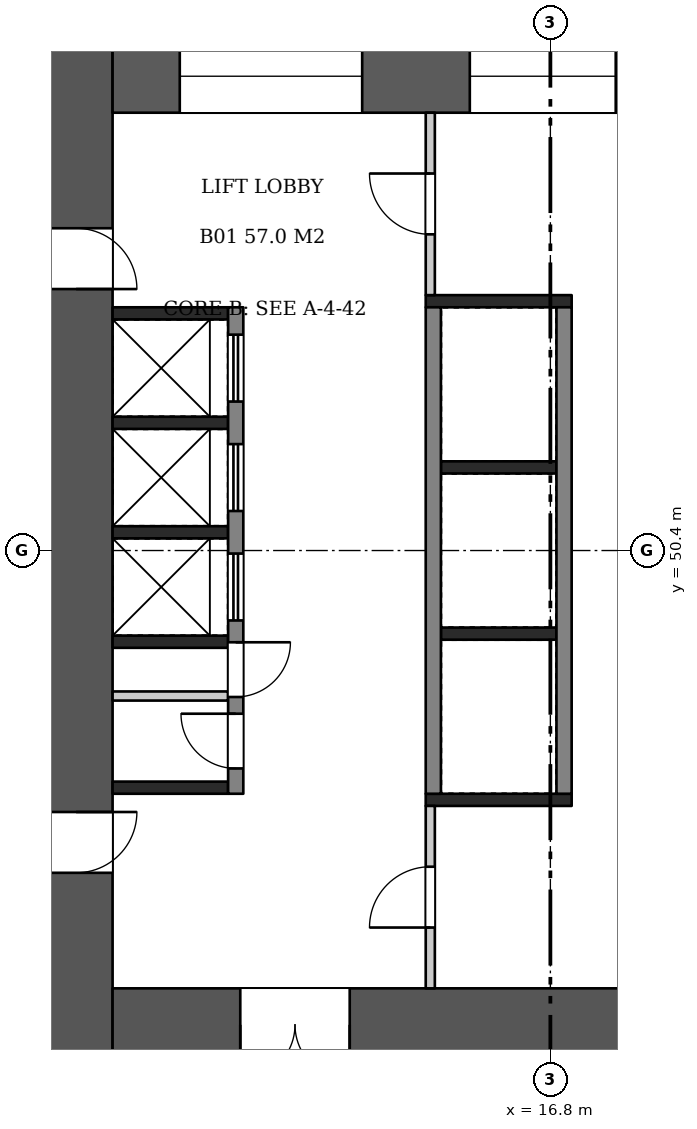
"""IFC4 building model, lengths in metres.
Left out: names, types, materials, properties, quantities, classifications, styles, units other than length and angle.
Written with IfcOpenShell. Run it as: python <this file> out.ifc"""

import sys

from ifc_helpers import new_model, si_unit, direction, frame, frame_2d, origin, place, context, subcontext, project, spatial, rectangle, extrude, element, fill, save


model = new_model("IFC4")
c1 = context("Model", 3, precision=1e-05, world=origin(), true_north=direction((0.0, 1.0)))
c2 = subcontext(c1, "Body", "Model", "MODEL_VIEW")
j1 = project(units=[si_unit("LENGTHUNIT", "METRE"), si_unit("PLANEANGLEUNIT", "RADIAN")], contexts=[c1])
p1 = place(None, origin())
s1 = spatial("IfcSite", under=j1, at=p1, CompositionType="ELEMENT")
p2 = place(p1, origin())
s2 = spatial("IfcBuilding", under=s1, at=p2, CompositionType="ELEMENT")
p3 = place(p2, frame((0.0, 0.0, 9.0)))
s3 = spatial("IfcBuildingStorey", under=s2, at=p3, CompositionType="ELEMENT", Elevation=9.0)
p4 = place(p3, frame((9.0, 58.8, 0.0), z_axis=(0.0, 0.0, 1.0), x_axis=(0.0, -1.0, 0.0)))
e1 = element("IfcWall", 1, at=p4, inside=s3, PredefinedType="SHEAR", context=c2, shape_type="SweptSolid", body=[
    extrude(rectangle(XDim=16.8, YDim=1.2, at=frame_2d((8.4, 0.0))), origin(), (0.0, 0.0, 1.0), 4.98),
])
p5 = place(p4, frame((3.1, 0.0, 0.0)))
e2 = element("IfcOpeningElement", 2, at=p5, cuts=e1, PredefinedType="OPENING", context=c2, shape_type="SweptSolid", body=[
    extrude(rectangle(XDim=1.0, YDim=2.1, at=frame_2d((0.5, 1.05))), frame((0.0, 0.61, 0.0), z_axis=(0.0, -1.0, 0.0), x_axis=(1.0, 0.0, 0.0)), (0.0, 0.0, 1.0), 1.22),
])
p6 = place(p4, frame((12.7, 0.0, 0.0)))
e3 = element("IfcOpeningElement", 3, at=p6, cuts=e1, PredefinedType="OPENING", context=c2, shape_type="SweptSolid", body=[
    extrude(rectangle(XDim=1.0, YDim=2.1, at=frame_2d((0.5, 1.05))), frame((0.0, 0.61, 0.0), z_axis=(0.0, -1.0, 0.0), x_axis=(1.0, 0.0, 0.0)), (0.0, 0.0, 1.0), 1.22),
])
p7 = place(p3, frame((9.6, 58.2, 0.0), z_axis=(0.0, 0.0, 1.0), x_axis=(1.0, 0.0, 0.0)))
e4 = element("IfcWall", 4, at=p7, inside=s3, PredefinedType="SHEAR", context=c2, shape_type="SweptSolid", body=[
    extrude(rectangle(XDim=14.4, YDim=1.2, at=frame_2d((7.2, 0.0))), origin(), (0.0, 0.0, 1.0), 4.98),
])
p8 = place(p7, frame((1.105, 0.0, 0.6)))
e5 = element("IfcOpeningElement", 5, at=p8, cuts=e4, PredefinedType="OPENING", context=c2, shape_type="SweptSolid", body=[
    extrude(rectangle(XDim=3.0, YDim=2.1, at=frame_2d((1.5, 1.05))), frame((0.0, 0.61, 0.0), z_axis=(0.0, -1.0, 0.0), x_axis=(1.0, 0.0, 0.0)), (0.0, 0.0, 1.0), 1.22),
])
p9 = place(p7, frame((5.875, 0.0, 0.6)))
e6 = element("IfcOpeningElement", 6, at=p9, cuts=e4, PredefinedType="OPENING", context=c2, shape_type="SweptSolid", body=[
    extrude(rectangle(XDim=2.4, YDim=2.1, at=frame_2d((1.2, 1.05))), frame((0.0, 0.61, 0.0), z_axis=(0.0, -1.0, 0.0), x_axis=(1.0, 0.0, 0.0)), (0.0, 0.0, 1.0), 1.22),
])
p10 = place(p7, frame((9.993, 0.0, 0.5)))
e7 = element("IfcOpeningElement", 7, at=p10, cuts=e4, PredefinedType="OPENING", context=c2, shape_type="SweptSolid", body=[
    extrude(rectangle(XDim=1.2, YDim=2.4, at=frame_2d((0.6, 1.2))), frame((0.0, 0.61, 0.0), z_axis=(0.0, -1.0, 0.0), x_axis=(1.0, 0.0, 0.0)), (0.0, 0.0, 1.0), 1.22),
])
p11 = place(p7, frame((12.197, 0.0, 0.5)))
e8 = element("IfcOpeningElement", 8, at=p11, cuts=e4, PredefinedType="OPENING", context=c2, shape_type="SweptSolid", body=[
    extrude(rectangle(XDim=1.2, YDim=2.4, at=frame_2d((0.6, 1.2))), frame((0.0, 0.61, 0.0), z_axis=(0.0, -1.0, 0.0), x_axis=(1.0, 0.0, 0.0)), (0.0, 0.0, 1.0), 1.22),
])
p12 = place(p3, frame((9.6, 42.6, 0.0), z_axis=(0.0, 0.0, 1.0), x_axis=(1.0, 0.0, 0.0)))
e9 = element("IfcWall", 9, at=p12, inside=s3, PredefinedType="SHEAR", context=c2, shape_type="SweptSolid", body=[
    extrude(rectangle(XDim=14.4, YDim=1.2, at=frame_2d((7.2, 0.0))), origin(), (0.0, 0.0, 1.0), 4.98),
])
p13 = place(p12, frame((2.1, 0.0, 0.0)))
e10 = element("IfcOpeningElement", 10, at=p13, cuts=e9, PredefinedType="OPENING", context=c2, shape_type="SweptSolid", body=[
    extrude(rectangle(XDim=1.8, YDim=2.1, at=frame_2d((0.9, 1.05))), frame((0.0, 0.61, 0.0), z_axis=(0.0, -1.0, 0.0), x_axis=(1.0, 0.0, 0.0)), (0.0, 0.0, 1.0), 1.22),
])
for number, where, z_axis, x_axis in (
    (11, (9.6, 54.3, 0.0), (0.0, 0.0, 1.0), (1.0, 0.0, 0.0)),
    (12, (9.6, 52.5, 0.0), (0.0, 0.0, 1.0), (1.0, 0.0, 0.0)),
    (13, (9.6, 50.7, 0.0), (0.0, 0.0, 1.0), (1.0, 0.0, 0.0)),
    (14, (9.6, 48.9, 0.0), (0.0, 0.0, 1.0), (1.0, 0.0, 0.0)),
    (15, (9.6, 46.5, 0.0), (0.0, 0.0, 1.0), (1.0, 0.0, 0.0)),
):
    element("IfcWall", number, at=place(p3, frame(where, z_axis=z_axis, x_axis=x_axis)), inside=s3, PredefinedType="SHEAR", context=c2, shape_type="SweptSolid", body=[
        extrude(rectangle(XDim=1.9, YDim=0.2, at=frame_2d((0.95, 0.0))), origin(), (0.0, 0.0, 1.0), 4.98),
    ])
p14 = place(p3, frame((9.6, 48.008, 0.0), z_axis=(0.0, 0.0, 1.0), x_axis=(1.0, 0.0, 0.0)))
e16 = element("IfcWall", 16, at=p14, inside=s3, PredefinedType="PARTITIONING", context=c2, shape_type="SweptSolid", body=[
    extrude(rectangle(XDim=1.9, YDim=0.15, at=frame_2d((0.95, 0.0))), origin(), (0.0, 0.0, 1.0), 4.98),
])
p15 = place(p3, frame((11.625, 54.4, 0.0), z_axis=(0.0, 0.0, 1.0), x_axis=(0.0, -1.0, 0.0)))
e17 = element("IfcWall", 17, at=p15, inside=s3, PredefinedType="SHEAR", context=c2, shape_type="SweptSolid", body=[
    extrude(rectangle(XDim=8.0, YDim=0.25, at=frame_2d((4.0, 0.0))), origin(), (0.0, 0.0, 1.0), 4.98),
])
p16 = place(p15, frame((0.45, 0.0, 0.0)))
e18 = element("IfcOpeningElement", 18, at=p16, cuts=e17, PredefinedType="OPENING", context=c2, shape_type="SweptSolid", body=[
    extrude(rectangle(XDim=1.1, YDim=2.1, at=frame_2d((0.55, 1.05))), frame((0.0, 0.135, 0.0), z_axis=(0.0, -1.0, 0.0), x_axis=(1.0, 0.0, 0.0)), (0.0, 0.0, 1.0), 0.27),
])
p17 = place(p15, frame((2.25, 0.0, 0.0)))
e19 = element("IfcOpeningElement", 19, at=p17, cuts=e17, PredefinedType="OPENING", context=c2, shape_type="SweptSolid", body=[
    extrude(rectangle(XDim=1.1, YDim=2.1, at=frame_2d((0.55, 1.05))), frame((0.0, 0.135, 0.0), z_axis=(0.0, -1.0, 0.0), x_axis=(1.0, 0.0, 0.0)), (0.0, 0.0, 1.0), 0.27),
])
p18 = place(p15, frame((4.05, 0.0, 0.0)))
e20 = element("IfcOpeningElement", 20, at=p18, cuts=e17, PredefinedType="OPENING", context=c2, shape_type="SweptSolid", body=[
    extrude(rectangle(XDim=1.1, YDim=2.1, at=frame_2d((0.55, 1.05))), frame((0.0, 0.135, 0.0), z_axis=(0.0, -1.0, 0.0), x_axis=(1.0, 0.0, 0.0)), (0.0, 0.0, 1.0), 0.27),
])
p19 = place(p15, frame((5.509, 0.0, 0.0)))
e21 = element("IfcOpeningElement", 21, at=p19, cuts=e17, PredefinedType="OPENING", context=c2, shape_type="SweptSolid", body=[
    extrude(rectangle(XDim=0.9, YDim=2.1, at=frame_2d((0.45, 1.05))), frame((0.0, 0.135, 0.0), z_axis=(0.0, -1.0, 0.0), x_axis=(1.0, 0.0, 0.0)), (0.0, 0.0, 1.0), 0.27),
])
p20 = place(p15, frame((6.684, 0.0, 0.0)))
e22 = element("IfcOpeningElement", 22, at=p20, cuts=e17, PredefinedType="OPENING", context=c2, shape_type="SweptSolid", body=[
    extrude(rectangle(XDim=0.9, YDim=2.1, at=frame_2d((0.45, 1.05))), frame((0.0, 0.135, 0.0), z_axis=(0.0, -1.0, 0.0), x_axis=(1.0, 0.0, 0.0)), (0.0, 0.0, 1.0), 0.27),
])
for number, where, z_axis, x_axis in (
    (23, (15.0, 51.767, 0.0), (0.0, 0.0, 1.0), (1.0, 0.0, 0.0)),
    (24, (15.0, 49.033, 0.0), (0.0, 0.0, 1.0), (1.0, 0.0, 0.0)),
):
    element("IfcWall", number, at=place(p3, frame(where, z_axis=z_axis, x_axis=x_axis)), inside=s3, PredefinedType="SHEAR", context=c2, shape_type="SweptSolid", body=[
        extrude(rectangle(XDim=1.9, YDim=0.2, at=frame_2d((0.95, 0.0))), origin(), (0.0, 0.0, 1.0), 4.98),
    ])
for number, where, z_axis, x_axis in (
    (25, (14.875, 54.4, 0.0), (0.0, 0.0, 1.0), (0.0, -1.0, 0.0)),
    (26, (17.025, 54.4, 0.0), (0.0, 0.0, 1.0), (0.0, -1.0, 0.0)),
):
    element("IfcWall", number, at=place(p3, frame(where, z_axis=z_axis, x_axis=x_axis)), inside=s3, PredefinedType="SHEAR", context=c2, shape_type="SweptSolid", body=[
        extrude(rectangle(XDim=8.0, YDim=0.25, at=frame_2d((4.0, 0.0))), origin(), (0.0, 0.0, 1.0), 4.98),
    ])
p21 = place(p3, frame((14.75, 54.5, 0.0), z_axis=(0.0, 0.0, 1.0), x_axis=(1.0, 0.0, 0.0)))
e27 = element("IfcWall", 27, at=p21, inside=s3, PredefinedType="SHEAR", context=c2, shape_type="SweptSolid", body=[
    extrude(rectangle(XDim=2.4, YDim=0.2, at=frame_2d((1.2, 0.0))), origin(), (0.0, 0.0, 1.0), 4.98),
])
p22 = place(p3, frame((14.825, 57.6, 0.0), z_axis=(0.0, 0.0, 1.0), x_axis=(0.0, -1.0, 0.0)))
e28 = element("IfcWall", 28, at=p22, inside=s3, PredefinedType="PARTITIONING", context=c2, shape_type="SweptSolid", body=[
    extrude(rectangle(XDim=3.0, YDim=0.15, at=frame_2d((1.5, 0.0))), origin(), (0.0, 0.0, 1.0), 4.98),
])
p23 = place(p22, frame((1.0, 0.0, 0.0)))
e29 = element("IfcOpeningElement", 29, at=p23, cuts=e28, PredefinedType="OPENING", context=c2, shape_type="SweptSolid", body=[
    extrude(rectangle(XDim=1.0, YDim=2.1, at=frame_2d((0.5, 1.05))), frame((0.0, 0.085, 0.0), z_axis=(0.0, -1.0, 0.0), x_axis=(1.0, 0.0, 0.0)), (0.0, 0.0, 1.0), 0.17),
])
p24 = place(p3, frame((14.75, 46.3, 0.0), z_axis=(0.0, 0.0, 1.0), x_axis=(1.0, 0.0, 0.0)))
e30 = element("IfcWall", 30, at=p24, inside=s3, PredefinedType="SHEAR", context=c2, shape_type="SweptSolid", body=[
    extrude(rectangle(XDim=2.4, YDim=0.2, at=frame_2d((1.2, 0.0))), origin(), (0.0, 0.0, 1.0), 4.98),
])
p25 = place(p3, frame((14.825, 46.2, 0.0), z_axis=(0.0, 0.0, 1.0), x_axis=(0.0, -1.0, 0.0)))
e31 = element("IfcWall", 31, at=p25, inside=s3, PredefinedType="PARTITIONING", context=c2, shape_type="SweptSolid", body=[
    extrude(rectangle(XDim=3.0, YDim=0.15, at=frame_2d((1.5, 0.0))), origin(), (0.0, 0.0, 1.0), 4.98),
])
p26 = place(p25, frame((1.0, 0.0, 0.0)))
e32 = element("IfcOpeningElement", 32, at=p26, cuts=e31, PredefinedType="OPENING", context=c2, shape_type="SweptSolid", body=[
    extrude(rectangle(XDim=1.0, YDim=2.1, at=frame_2d((0.5, 1.05))), frame((0.0, 0.085, 0.0), z_axis=(0.0, -1.0, 0.0), x_axis=(1.0, 0.0, 0.0)), (0.0, 0.0, 1.0), 0.17),
])
p27 = place(p5, origin())
e33 = element("IfcDoor", 33, at=p27, inside=s3, OperationType="SINGLE_SWING_RIGHT", PredefinedType="DOOR", context=c2, shape_type="SweptSolid", body=[
    extrude(rectangle(XDim=1.0, YDim=2.1, at=frame_2d((0.5, 1.05))), frame((0.0, 0.025, 0.0), z_axis=(0.0, -1.0, 0.0), x_axis=(1.0, 0.0, 0.0)), (0.0, 0.0, 1.0), 0.05),
])
fill(e2, e33)
p28 = place(p6, origin())
e34 = element("IfcDoor", 34, at=p28, inside=s3, OperationType="SINGLE_SWING_LEFT", PredefinedType="DOOR", context=c2, shape_type="SweptSolid", body=[
    extrude(rectangle(XDim=1.0, YDim=2.1, at=frame_2d((0.5, 1.05))), frame((0.0, 0.025, 0.0), z_axis=(0.0, -1.0, 0.0), x_axis=(1.0, 0.0, 0.0)), (0.0, 0.0, 1.0), 0.05),
])
fill(e3, e34)
p29 = place(p13, frame((1.8, 0.0, 0.0), z_axis=(0.0, 0.0, 1.0), x_axis=(-1.0, 0.0, 0.0)))
e35 = element("IfcDoor", 35, at=p29, inside=s3, OperationType="DOUBLE_DOOR_SINGLE_SWING", PredefinedType="DOOR", context=c2, shape_type="SweptSolid", body=[
    extrude(rectangle(XDim=1.8, YDim=2.1, at=frame_2d((0.9, 1.05))), frame((0.0, 0.025, 0.0), z_axis=(0.0, -1.0, 0.0), x_axis=(1.0, 0.0, 0.0)), (0.0, 0.0, 1.0), 0.05),
])
fill(e10, e35)
p30 = place(p16, origin())
e36 = element("IfcDoor", 36, at=p30, inside=s3, OperationType="DOUBLE_DOOR_SLIDING", PredefinedType="DOOR", context=c2, shape_type="SweptSolid", body=[
    extrude(rectangle(XDim=1.1, YDim=2.1, at=frame_2d((0.55, 1.05))), frame((0.0, 0.025, 0.0), z_axis=(0.0, -1.0, 0.0), x_axis=(1.0, 0.0, 0.0)), (0.0, 0.0, 1.0), 0.05),
])
fill(e18, e36)
p31 = place(p17, origin())
e37 = element("IfcDoor", 37, at=p31, inside=s3, OperationType="DOUBLE_DOOR_SLIDING", PredefinedType="DOOR", context=c2, shape_type="SweptSolid", body=[
    extrude(rectangle(XDim=1.1, YDim=2.1, at=frame_2d((0.55, 1.05))), frame((0.0, 0.025, 0.0), z_axis=(0.0, -1.0, 0.0), x_axis=(1.0, 0.0, 0.0)), (0.0, 0.0, 1.0), 0.05),
])
fill(e19, e37)
p32 = place(p18, origin())
e38 = element("IfcDoor", 38, at=p32, inside=s3, OperationType="DOUBLE_DOOR_SLIDING", PredefinedType="DOOR", context=c2, shape_type="SweptSolid", body=[
    extrude(rectangle(XDim=1.1, YDim=2.1, at=frame_2d((0.55, 1.05))), frame((0.0, 0.025, 0.0), z_axis=(0.0, -1.0, 0.0), x_axis=(1.0, 0.0, 0.0)), (0.0, 0.0, 1.0), 0.05),
])
fill(e20, e38)
p33 = place(p19, origin())
e39 = element("IfcDoor", 39, at=p33, inside=s3, OperationType="SINGLE_SWING_LEFT", PredefinedType="DOOR", context=c2, shape_type="SweptSolid", body=[
    extrude(rectangle(XDim=0.9, YDim=2.1, at=frame_2d((0.45, 1.05))), frame((0.0, 0.025, 0.0), z_axis=(0.0, -1.0, 0.0), x_axis=(1.0, 0.0, 0.0)), (0.0, 0.0, 1.0), 0.05),
])
fill(e21, e39)
p34 = place(p20, frame((0.9, 0.0, 0.0), z_axis=(0.0, 0.0, 1.0), x_axis=(-1.0, 0.0, 0.0)))
e40 = element("IfcDoor", 40, at=p34, inside=s3, OperationType="SINGLE_SWING_RIGHT", PredefinedType="DOOR", context=c2, shape_type="SweptSolid", body=[
    extrude(rectangle(XDim=0.9, YDim=2.1, at=frame_2d((0.45, 1.05))), frame((0.0, 0.025, 0.0), z_axis=(0.0, -1.0, 0.0), x_axis=(1.0, 0.0, 0.0)), (0.0, 0.0, 1.0), 0.05),
])
fill(e22, e40)
p35 = place(p23, frame((1.0, 0.0, 0.0), z_axis=(0.0, 0.0, 1.0), x_axis=(-1.0, 0.0, 0.0)))
e41 = element("IfcDoor", 41, at=p35, inside=s3, OperationType="SINGLE_SWING_RIGHT", PredefinedType="DOOR", context=c2, shape_type="SweptSolid", body=[
    extrude(rectangle(XDim=1.0, YDim=2.1, at=frame_2d((0.5, 1.05))), frame((0.0, 0.025, 0.0), z_axis=(0.0, -1.0, 0.0), x_axis=(1.0, 0.0, 0.0)), (0.0, 0.0, 1.0), 0.05),
])
fill(e29, e41)
p36 = place(p26, frame((1.0, 0.0, 0.0), z_axis=(0.0, 0.0, 1.0), x_axis=(-1.0, 0.0, 0.0)))
e42 = element("IfcDoor", 42, at=p36, inside=s3, OperationType="SINGLE_SWING_LEFT", PredefinedType="DOOR", context=c2, shape_type="SweptSolid", body=[
    extrude(rectangle(XDim=1.0, YDim=2.1, at=frame_2d((0.5, 1.05))), frame((0.0, 0.025, 0.0), z_axis=(0.0, -1.0, 0.0), x_axis=(1.0, 0.0, 0.0)), (0.0, 0.0, 1.0), 0.05),
])
fill(e32, e42)
p37 = place(p8, origin())
e43 = element("IfcWindow", 43, at=p37, inside=s3, PartitioningType="SINGLE_PANEL", PredefinedType="WINDOW", context=c2, shape_type="SweptSolid", body=[
    extrude(rectangle(XDim=3.0, YDim=2.1, at=frame_2d((1.5, 1.05))), frame((0.0, 0.03, 0.0), z_axis=(0.0, -1.0, 0.0), x_axis=(1.0, 0.0, 0.0)), (0.0, 0.0, 1.0), 0.06),
])
fill(e5, e43)
p38 = place(p9, origin())
e44 = element("IfcWindow", 44, at=p38, inside=s3, PartitioningType="SINGLE_PANEL", PredefinedType="WINDOW", context=c2, shape_type="SweptSolid", body=[
    extrude(rectangle(XDim=2.4, YDim=2.1, at=frame_2d((1.2, 1.05))), frame((0.0, 0.03, 0.0), z_axis=(0.0, -1.0, 0.0), x_axis=(1.0, 0.0, 0.0)), (0.0, 0.0, 1.0), 0.06),
])
fill(e6, e44)
save(model, sys.argv[1])
